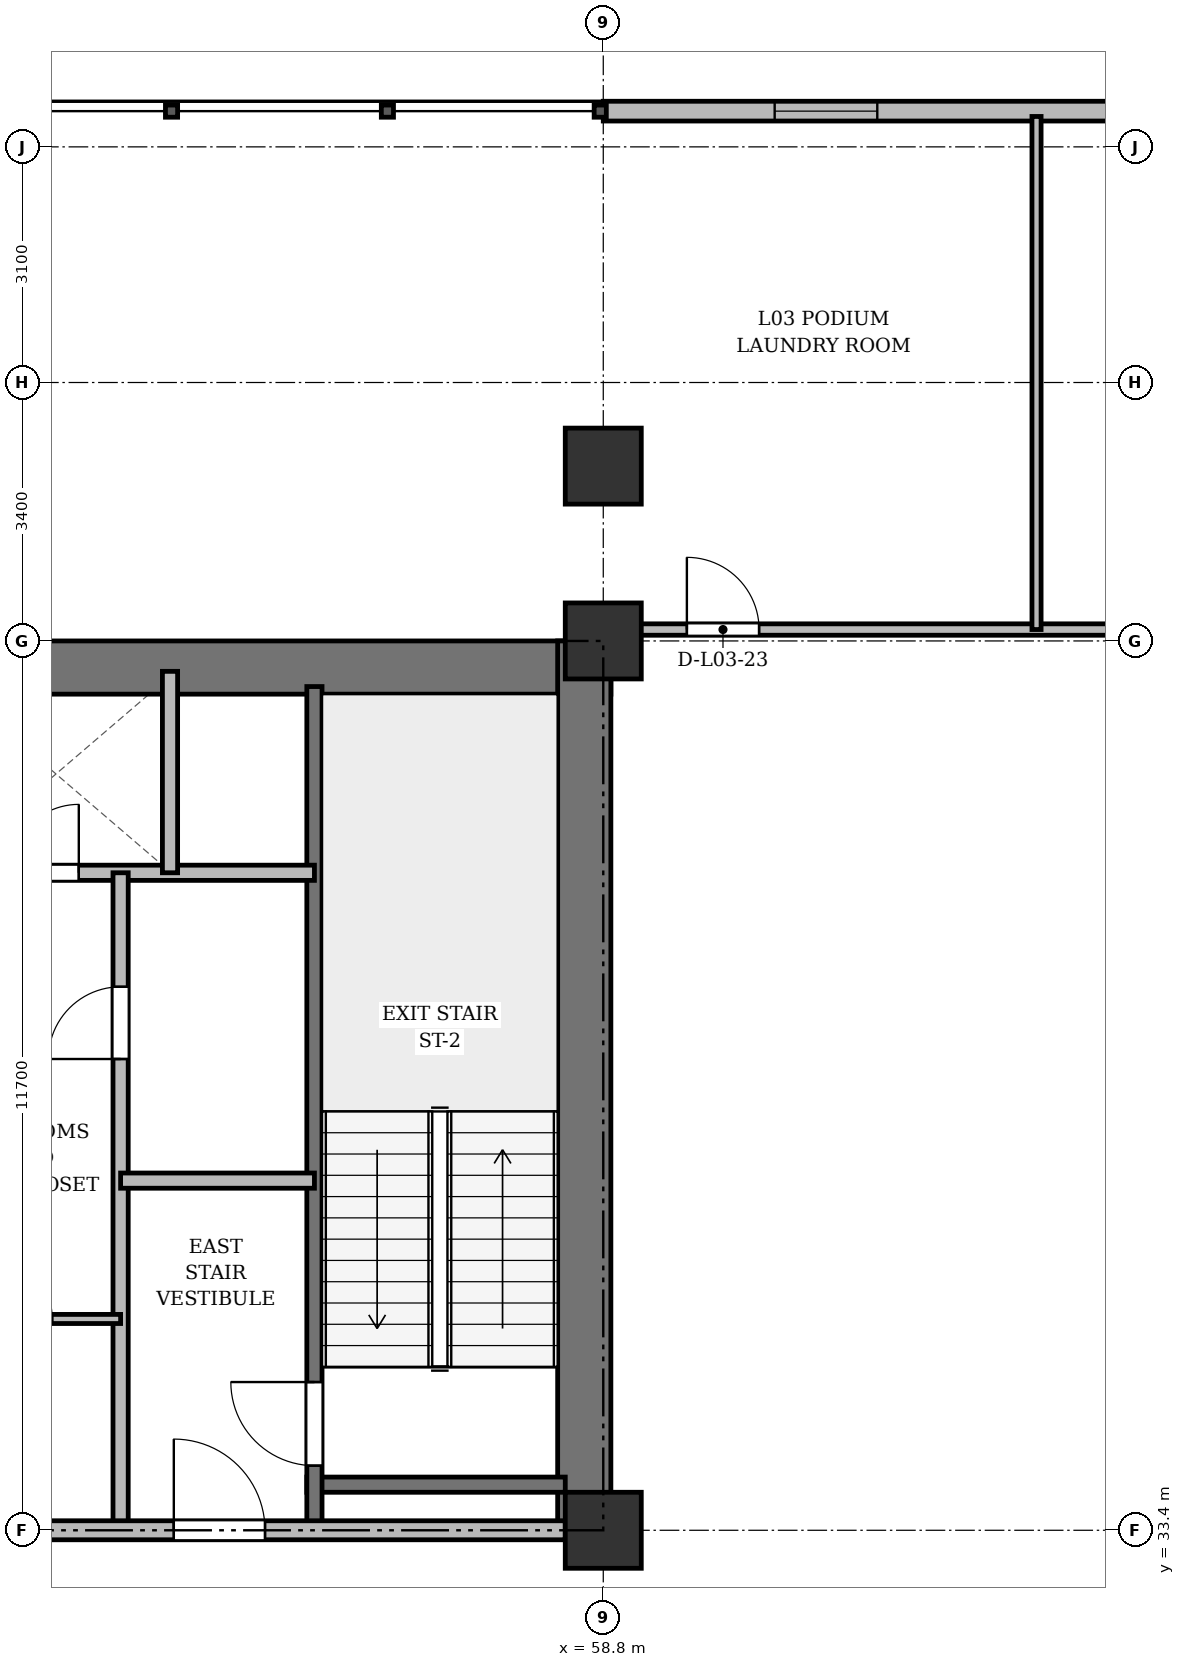
"""IFC4 building model, lengths in metres.
Left out: names, types, materials, properties, quantities, classifications, styles, units other than length and angle.
Written with IfcOpenShell. Run it as: python <this file> out.ifc"""

import sys

from ifc_helpers import new_model, si_unit, direction, frame, frame_2d, origin, origin_2d, place, context, subcontext, project, spatial, rectangle, extrude, source, transform, mapped, element, fill, save


model = new_model("IFC4")
c1 = context("Model", 3, precision=1e-05, world=origin(), true_north=direction((0.0, 1.0)))
c2 = subcontext(c1, "Body", "Model", "MODEL_VIEW")
j1 = project(units=[si_unit("LENGTHUNIT", "METRE"), si_unit("PLANEANGLEUNIT", "RADIAN")], contexts=[c1])
p1 = place(None, origin())
s1 = spatial("IfcSite", under=j1, at=p1, CompositionType="ELEMENT")
p2 = place(p1, origin())
s2 = spatial("IfcBuilding", under=s1, at=p2, CompositionType="ELEMENT")
p3 = place(p2, frame((0.0, 0.0, 14.2)))
s3 = spatial("IfcBuildingStorey", under=s2, at=p3, CompositionType="ELEMENT", Elevation=14.2)
m1 = source(origin(), c2, "Body", "SweptSolid", [
    extrude(rectangle(XDim=1.0, YDim=1.0, at=origin_2d()), origin(), (0.0, 0.0, 1.0), 4.5),
])
for number, where, z_axis, x_axis in (
    (1, (58.8, 33.4, 0.0), (0.0, 0.0, 1.0), (1.0, 0.0, 0.0)),
    (2, (58.8, 45.1, 0.0), (0.0, 0.0, 1.0), (1.0, 0.0, 0.0)),
    (3, (58.8, 47.4, 0.0), (0.0, 0.0, 1.0), (1.0, 0.0, 0.0)),
):
    element("IfcColumn", number, at=place(p3, frame(where, z_axis=z_axis, x_axis=x_axis)), inside=s3, PredefinedType="COLUMN", context=c2, shape_type="MappedRepresentation", body=[
        mapped(m1, transform((0.0, 0.0, 0.0), x_axis=(1.0, 0.0, 0.0), y_axis=(0.0, 1.0, 0.0), z_axis=(0.0, 0.0, 1.0), scale=1.0)),
    ])
p4 = place(p3, frame((58.8, 52.07, 0.0), z_axis=(0.0, 0.0, 1.0), x_axis=(1.0, 0.0, 0.0)))
e4 = element("IfcWall", 4, at=p4, inside=s3, PredefinedType="SOLIDWALL", context=c2, shape_type="SweptSolid", body=[
    extrude(rectangle(XDim=17.45, YDim=0.26, at=frame_2d((8.725, 0.0))), origin(), (0.0, 0.0, 1.0), 4.15),
])
p5 = place(p4, frame((2.255, 0.0, 0.9)))
e5 = element("IfcOpeningElement", 5, at=p5, cuts=e4, PredefinedType="OPENING", context=c2, shape_type="SweptSolid", body=[
    extrude(rectangle(XDim=1.35, YDim=1.5, at=frame_2d((0.675, 0.75))), frame((0.0, 0.14, 0.0), z_axis=(0.0, -1.0, 0.0), x_axis=(1.0, 0.0, 0.0)), (0.0, 0.0, 1.0), 0.28),
])
p6 = place(p4, frame((10.82, 0.0, 0.9)))
e6 = element("IfcOpeningElement", 6, at=p6, cuts=e4, PredefinedType="OPENING", context=c2, shape_type="SweptSolid", body=[
    extrude(rectangle(XDim=1.35, YDim=1.5, at=frame_2d((0.675, 0.75))), frame((0.0, 0.14, 0.0), z_axis=(0.0, -1.0, 0.0), x_axis=(1.0, 0.0, 0.0)), (0.0, 0.0, 1.0), 0.28),
])
p7 = place(p3, frame((15.5, 44.75, 0.0), z_axis=(0.0, 0.0, 1.0), x_axis=(1.0, 0.0, 0.0)))
e7 = element("IfcWall", 7, at=p7, inside=s3, PredefinedType="SHEAR", context=c2, shape_type="SweptSolid", body=[
    extrude(rectangle(XDim=43.4, YDim=0.7, at=frame_2d((21.7, 0.0))), origin(), (0.0, 0.0, 1.0), 4.15),
])
p8 = place(p3, frame((58.55, 33.4, 0.0), z_axis=(0.0, 0.0, 1.0), x_axis=(0.0, 1.0, 0.0)))
e8 = element("IfcWall", 8, at=p8, inside=s3, PredefinedType="SHEAR", context=c2, shape_type="SweptSolid", body=[
    extrude(rectangle(XDim=11.7, YDim=0.7, at=frame_2d((5.85, 0.0))), origin(), (0.0, 0.0, 1.0), 4.15),
])
p9 = place(p3, frame((54.9, 34.0, 0.0), z_axis=(0.0, 0.0, 1.0), x_axis=(1.0, 0.0, 0.0)))
e9 = element("IfcWall", 9, at=p9, inside=s3, PredefinedType="SHEAR", context=c2, shape_type="SweptSolid", body=[
    extrude(rectangle(XDim=3.4, YDim=0.2, at=frame_2d((1.7, 0.0))), origin(), (0.0, 0.0, 1.0), 4.15),
])
p10 = place(p3, frame((55.0, 33.4, 0.0), z_axis=(0.0, 0.0, 1.0), x_axis=(0.0, 1.0, 0.0)))
e10 = element("IfcWall", 10, at=p10, inside=s3, PredefinedType="SHEAR", context=c2, shape_type="SweptSolid", body=[
    extrude(rectangle(XDim=11.1, YDim=0.2, at=frame_2d((5.55, 0.0))), origin(), (0.0, 0.0, 1.0), 4.15),
])
p11 = place(p10, frame((0.85, 0.0, 0.0)))
e11 = element("IfcOpeningElement", 11, at=p11, cuts=e10, PredefinedType="OPENING", context=c2, shape_type="SweptSolid", body=[
    extrude(rectangle(XDim=1.1, YDim=2.15, at=frame_2d((0.55, 1.075))), frame((0.0, 0.11, 0.0), z_axis=(0.0, -1.0, 0.0), x_axis=(1.0, 0.0, 0.0)), (0.0, 0.0, 1.0), 0.22),
])
p12 = place(p3, frame((47.15, 42.05, 0.0), z_axis=(0.0, 0.0, 1.0), x_axis=(1.0, 0.0, 0.0)))
e12 = element("IfcWall", 12, at=p12, inside=s3, PredefinedType="SOLIDWALL", context=c2, shape_type="SweptSolid", body=[
    extrude(rectangle(XDim=7.85, YDim=0.2, at=frame_2d((3.925, 0.0))), origin(), (0.0, 0.0, 1.0), 4.15),
])
p13 = place(p12, frame((0.75, 0.0, 0.0)))
e13 = element("IfcOpeningElement", 13, at=p13, cuts=e12, PredefinedType="OPENING", context=c2, shape_type="SweptSolid", body=[
    extrude(rectangle(XDim=0.9, YDim=2.1, at=frame_2d((0.45, 1.05))), frame((0.0, 0.11, 0.0), z_axis=(0.0, -1.0, 0.0), x_axis=(1.0, 0.0, 0.0)), (0.0, 0.0, 1.0), 0.22),
])
p14 = place(p12, frame((3.85, 0.0, 0.0)))
e14 = element("IfcOpeningElement", 14, at=p14, cuts=e12, PredefinedType="OPENING", context=c2, shape_type="SweptSolid", body=[
    extrude(rectangle(XDim=0.9, YDim=2.1, at=frame_2d((0.45, 1.05))), frame((0.0, 0.11, 0.0), z_axis=(0.0, -1.0, 0.0), x_axis=(1.0, 0.0, 0.0)), (0.0, 0.0, 1.0), 0.22),
])
p15 = place(p3, frame((53.1, 42.05, 0.0), z_axis=(0.0, 0.0, 1.0), x_axis=(0.0, 1.0, 0.0)))
e15 = element("IfcWall", 15, at=p15, inside=s3, PredefinedType="SOLIDWALL", context=c2, shape_type="SweptSolid", body=[
    extrude(rectangle(XDim=2.65, YDim=0.2, at=frame_2d((1.325, 0.0))), origin(), (0.0, 0.0, 1.0), 4.15),
])
p16 = place(p3, frame((52.45, 33.4, 0.0), z_axis=(0.0, 0.0, 1.0), x_axis=(0.0, 1.0, 0.0)))
e16 = element("IfcWall", 16, at=p16, inside=s3, PredefinedType="PARTITIONING", context=c2, shape_type="SweptSolid", body=[
    extrude(rectangle(XDim=8.65, YDim=0.2, at=frame_2d((4.325, 0.0))), origin(), (0.0, 0.0, 1.0), 3.05),
])
p17 = place(p16, frame((6.2, 0.0, 0.0)))
e17 = element("IfcOpeningElement", 17, at=p17, cuts=e16, PredefinedType="OPENING", context=c2, shape_type="SweptSolid", body=[
    extrude(rectangle(XDim=0.95, YDim=2.15, at=frame_2d((0.475, 1.075))), frame((0.0, 0.11, 0.0), z_axis=(0.0, -1.0, 0.0), x_axis=(1.0, 0.0, 0.0)), (0.0, 0.0, 1.0), 0.22),
])
p18 = place(p3, frame((52.45, 38.0, 0.0), z_axis=(0.0, 0.0, 1.0), x_axis=(1.0, 0.0, 0.0)))
e18 = element("IfcWall", 18, at=p18, inside=s3, PredefinedType="PARTITIONING", context=c2, shape_type="SweptSolid", body=[
    extrude(rectangle(XDim=2.55, YDim=0.2, at=frame_2d((1.275, 0.0))), origin(), (0.0, 0.0, 1.0), 4.15),
])
p19 = place(p3, frame((47.15, 36.18, 0.0), z_axis=(0.0, 0.0, 1.0), x_axis=(1.0, 0.0, 0.0)))
e19 = element("IfcWall", 19, at=p19, inside=s3, PredefinedType="PARTITIONING", context=c2, shape_type="SweptSolid", body=[
    extrude(rectangle(XDim=5.3, YDim=0.12, at=frame_2d((2.65, 0.0))), origin(), (0.0, 0.0, 1.0), 4.15),
])
p20 = place(p19, frame((0.75, 0.0, 0.0)))
e20 = element("IfcOpeningElement", 20, at=p20, cuts=e19, PredefinedType="OPENING", context=c2, shape_type="SweptSolid", body=[
    extrude(rectangle(XDim=0.95, YDim=2.15, at=frame_2d((0.475, 1.075))), frame((0.0, 0.07, 0.0), z_axis=(0.0, -1.0, 0.0), x_axis=(1.0, 0.0, 0.0)), (0.0, 0.0, 1.0), 0.14),
])
p21 = place(p19, frame((3.45, 0.0, 0.0)))
e21 = element("IfcOpeningElement", 21, at=p21, cuts=e19, PredefinedType="OPENING", context=c2, shape_type="SweptSolid", body=[
    extrude(rectangle(XDim=0.95, YDim=2.15, at=frame_2d((0.475, 1.075))), frame((0.0, 0.07, 0.0), z_axis=(0.0, -1.0, 0.0), x_axis=(1.0, 0.0, 0.0)), (0.0, 0.0, 1.0), 0.14),
])
p22 = place(p3, frame((47.15, 33.4, 0.0), z_axis=(0.0, 0.0, 1.0), x_axis=(1.0, 0.0, 0.0)))
e22 = element("IfcWall", 22, at=p22, inside=s3, PredefinedType="PARTITIONING", context=c2, shape_type="SweptSolid", body=[
    extrude(rectangle(XDim=11.15, YDim=0.25, at=frame_2d((5.575, 0.0))), origin(), (0.0, 0.0, 1.0), 3.05),
])
p23 = place(p22, frame((0.7, 0.0, 0.0)))
e23 = element("IfcOpeningElement", 23, at=p23, cuts=e22, PredefinedType="OPENING", context=c2, shape_type="SweptSolid", body=[
    extrude(rectangle(XDim=0.95, YDim=2.15, at=frame_2d((0.475, 1.075))), frame((0.0, 0.135, 0.0), z_axis=(0.0, -1.0, 0.0), x_axis=(1.0, 0.0, 0.0)), (0.0, 0.0, 1.0), 0.27),
])
p24 = place(p22, frame((6.0, 0.0, 0.0)))
e24 = element("IfcOpeningElement", 24, at=p24, cuts=e22, PredefinedType="OPENING", context=c2, shape_type="SweptSolid", body=[
    extrude(rectangle(XDim=1.2, YDim=2.15, at=frame_2d((0.6, 1.075))), frame((0.0, 0.135, 0.0), z_axis=(0.0, -1.0, 0.0), x_axis=(1.0, 0.0, 0.0)), (0.0, 0.0, 1.0), 0.27),
])
p25 = place(p3, frame((58.6, 45.25, 0.0), z_axis=(0.0, 0.0, 1.0), x_axis=(1.0, 0.0, 0.0)))
e25 = element("IfcWall", 25, at=p25, inside=s3, PredefinedType="PARTITIONING", context=c2, shape_type="SweptSolid", body=[
    extrude(rectangle(XDim=17.55, YDim=0.15, at=frame_2d((8.775, 0.0))), origin(), (0.0, 0.0, 1.0), 3.05),
])
p26 = place(p25, frame((1.3, 0.0, 0.0)))
e26 = element("IfcOpeningElement", 26, at=p26, cuts=e25, PredefinedType="OPENING", context=c2, shape_type="SweptSolid", body=[
    extrude(rectangle(XDim=0.95, YDim=2.15, at=frame_2d((0.475, 1.075))), frame((0.0, 0.085, 0.0), z_axis=(0.0, -1.0, 0.0), x_axis=(1.0, 0.0, 0.0)), (0.0, 0.0, 1.0), 0.17),
])
p27 = place(p25, frame((7.0, 0.0, 0.0)))
e27 = element("IfcOpeningElement", 27, at=p27, cuts=e25, PredefinedType="OPENING", context=c2, shape_type="SweptSolid", body=[
    extrude(rectangle(XDim=0.95, YDim=2.15, at=frame_2d((0.475, 1.075))), frame((0.0, 0.085, 0.0), z_axis=(0.0, -1.0, 0.0), x_axis=(1.0, 0.0, 0.0)), (0.0, 0.0, 1.0), 0.17),
])
p28 = place(p3, frame((64.5, 45.25, 0.0), z_axis=(0.0, 0.0, 1.0), x_axis=(0.0, 1.0, 0.0)))
e28 = element("IfcWall", 28, at=p28, inside=s3, PredefinedType="PARTITIONING", context=c2, shape_type="SweptSolid", body=[
    extrude(rectangle(XDim=6.75, YDim=0.12, at=frame_2d((3.375, 0.0))), origin(), (0.0, 0.0, 1.0), 3.05),
])
m2 = source(origin(), c2, "Body", "SweptSolid", [
    extrude(rectangle(XDim=1.35, YDim=1.5, at=frame_2d((0.675, 0.75))), frame((0.0, 0.03, 0.0), z_axis=(0.0, -1.0, 0.0), x_axis=(1.0, 0.0, 0.0)), (0.0, 0.0, 1.0), 0.06),
])
p29 = place(p5, origin())
e29 = element("IfcWindow", 29, at=p29, inside=s3, PartitioningType="SINGLE_PANEL", PredefinedType="WINDOW", context=c2, shape_type="MappedRepresentation", body=[
    mapped(m2, transform((0.0, 0.0, 0.0), x_axis=(1.0, 0.0, 0.0), y_axis=(0.0, 1.0, 0.0), z_axis=(0.0, 0.0, 1.0), scale=1.0)),
])
fill(e5, e29)
m3 = source(origin(), c2, "Body", "SweptSolid", [
    extrude(rectangle(XDim=1.1, YDim=2.15, at=frame_2d((0.55, 1.075))), frame((0.0, 0.025, 0.0), z_axis=(0.0, -1.0, 0.0), x_axis=(1.0, 0.0, 0.0)), (0.0, 0.0, 1.0), 0.05),
])
p30 = place(p11, origin())
e30 = element("IfcDoor", 30, at=p30, inside=s3, OperationType="SINGLE_SWING_RIGHT", PredefinedType="DOOR", context=c2, shape_type="MappedRepresentation", body=[
    mapped(m3, transform((0.0, 0.0, 0.0), x_axis=(1.0, 0.0, 0.0), y_axis=(0.0, 1.0, 0.0), z_axis=(0.0, 0.0, 1.0), scale=1.0)),
])
fill(e11, e30)
m4 = source(origin(), c2, "Body", "SweptSolid", [
    extrude(rectangle(XDim=0.9, YDim=2.1, at=frame_2d((0.45, 1.05))), frame((0.0, 0.025, 0.0), z_axis=(0.0, -1.0, 0.0), x_axis=(1.0, 0.0, 0.0)), (0.0, 0.0, 1.0), 0.05),
])
p31 = place(p14, origin())
e31 = element("IfcDoor", 31, at=p31, inside=s3, OperationType="SINGLE_SWING_RIGHT", PredefinedType="DOOR", context=c2, shape_type="MappedRepresentation", body=[
    mapped(m4, transform((0.0, 0.0, 0.0), x_axis=(1.0, 0.0, 0.0), y_axis=(0.0, 1.0, 0.0), z_axis=(0.0, 0.0, 1.0), scale=1.0)),
])
fill(e14, e31)
m5 = source(origin(), c2, "Body", "SweptSolid", [
    extrude(rectangle(XDim=0.95, YDim=2.15, at=frame_2d((0.475, 1.075))), frame((0.0, 0.025, 0.0), z_axis=(0.0, -1.0, 0.0), x_axis=(1.0, 0.0, 0.0)), (0.0, 0.0, 1.0), 0.05),
])
p32 = place(p17, origin())
e32 = element("IfcDoor", 32, at=p32, inside=s3, OperationType="SINGLE_SWING_LEFT", PredefinedType="DOOR", context=c2, shape_type="MappedRepresentation", body=[
    mapped(m5, transform((0.0, 0.0, 0.0), x_axis=(1.0, 0.0, 0.0), y_axis=(0.0, 1.0, 0.0), z_axis=(0.0, 0.0, 1.0), scale=1.0)),
])
fill(e17, e32)
m6 = source(origin(), c2, "Body", "SweptSolid", [
    extrude(rectangle(XDim=1.2, YDim=2.15, at=frame_2d((0.6, 1.075))), frame((0.0, 0.025, 0.0), z_axis=(0.0, -1.0, 0.0), x_axis=(1.0, 0.0, 0.0)), (0.0, 0.0, 1.0), 0.05),
])
p33 = place(p24, origin())
e33 = element("IfcDoor", 33, at=p33, inside=s3, OperationType="SINGLE_SWING_LEFT", PredefinedType="DOOR", context=c2, shape_type="MappedRepresentation", body=[
    mapped(m6, transform((0.0, 0.0, 0.0), x_axis=(1.0, 0.0, 0.0), y_axis=(0.0, 1.0, 0.0), z_axis=(0.0, 0.0, 1.0), scale=1.0)),
])
fill(e24, e33)
p34 = place(p26, origin())
e34 = element("IfcDoor", 34, at=p34, inside=s3, OperationType="SINGLE_SWING_LEFT", PredefinedType="DOOR", context=c2, shape_type="MappedRepresentation", body=[
    mapped(m5, transform((0.0, 0.0, 0.0), x_axis=(1.0, 0.0, 0.0), y_axis=(0.0, 1.0, 0.0), z_axis=(0.0, 0.0, 1.0), scale=1.0)),
])
fill(e26, e34)
save(model, sys.argv[1])
